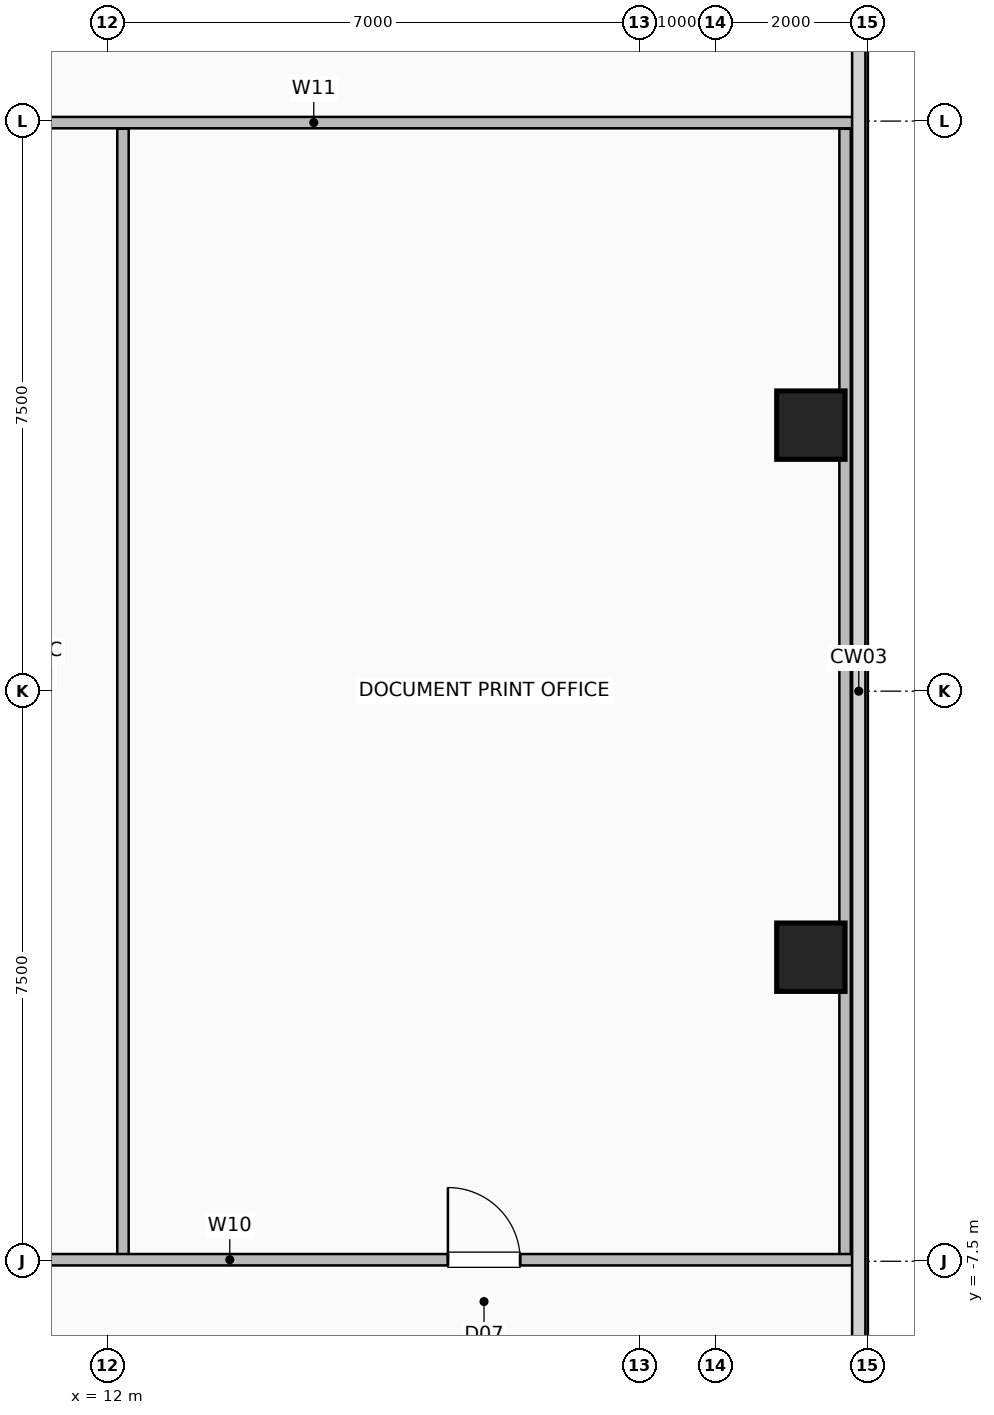
"""IFC4 building model, lengths in metres.
Left out: names, types, materials, properties, quantities, classifications, styles, units other than length and angle.
Written with IfcOpenShell. Run it as: python <this file> out.ifc"""

import sys

from ifc_helpers import new_model, si_unit, direction, frame, frame_2d, origin, origin_2d, place, context, subcontext, project, spatial, rectangle, hollow_rectangle, extrude, element, fill, save


model = new_model("IFC4")
c1 = context("Model", 3, precision=1e-05, world=origin(), true_north=direction((0.0, 1.0)))
c2 = subcontext(c1, "Body", "Model", "MODEL_VIEW")
j1 = project(units=[si_unit("LENGTHUNIT", "METRE"), si_unit("PLANEANGLEUNIT", "RADIAN")], contexts=[c1])
p1 = place(None, origin())
s1 = spatial("IfcSite", under=j1, at=p1, CompositionType="ELEMENT")
p2 = place(p1, origin())
s2 = spatial("IfcBuilding", under=s1, at=p2, CompositionType="ELEMENT")
p3 = place(p2, frame((0.0, 0.0, 101.2)))
s3 = spatial("IfcBuildingStorey", under=s2, at=p3, CompositionType="ELEMENT", Elevation=101.2)
for number, where, z_axis, x_axis in (
    (1, (21.25, -3.5, 0.0), (0.0, 0.0, 1.0), (1.0, 0.0, 0.0)),
    (2, (21.25, 3.5, 0.0), (0.0, 0.0, 1.0), (1.0, 0.0, 0.0)),
):
    element("IfcColumn", number, at=place(p3, frame(where, z_axis=z_axis, x_axis=x_axis)), inside=s3, PredefinedType="COLUMN", context=c2, shape_type="SweptSolid", body=[
        extrude(hollow_rectangle(XDim=0.9, YDim=0.9, WallThickness=0.045, at=origin_2d()), origin(), (0.0, 0.0, 1.0), 3.6),
    ])
for number, where, z_axis, x_axis in (
    (3, (12.2, -7.48, 0.0), (0.0, 0.0, 1.0), (0.0, 1.0, 0.0)),
    (4, (21.7, -7.48, 0.0), (0.0, 0.0, 1.0), (0.0, 1.0, 0.0)),
):
    element("IfcWall", number, at=place(p3, frame(where, z_axis=z_axis, x_axis=x_axis)), inside=s3, PredefinedType="PARTITIONING", context=c2, shape_type="SweptSolid", body=[
        extrude(rectangle(XDim=14.88, YDim=0.15, at=frame_2d((7.44, 0.0))), origin(), (0.0, 0.0, 1.0), 3.36),
    ])
p4 = place(p3, frame((8.28, -7.48, 0.0), z_axis=(0.0, 0.0, 1.0), x_axis=(1.0, 0.0, 0.0)))
e5 = element("IfcWall", 5, at=p4, inside=s3, PredefinedType="PARTITIONING", context=c2, shape_type="SweptSolid", body=[
    extrude(rectangle(XDim=13.54, YDim=0.15, at=frame_2d((6.77, 0.0))), origin(), (0.0, 0.0, 1.0), 3.36),
])
p5 = place(p4, frame((1.505, 0.0, 0.0)))
e6 = element("IfcOpeningElement", 6, at=p5, cuts=e5, PredefinedType="OPENING", context=c2, shape_type="SweptSolid", body=[
    extrude(rectangle(XDim=0.95, YDim=2.06, at=frame_2d((0.475, 1.03))), frame((0.0, 0.085, 0.0), z_axis=(0.0, -1.0, 0.0), x_axis=(1.0, 0.0, 0.0)), (0.0, 0.0, 1.0), 0.17),
])
p6 = place(p4, frame((8.195, 0.0, 0.0)))
e7 = element("IfcOpeningElement", 7, at=p6, cuts=e5, PredefinedType="OPENING", context=c2, shape_type="SweptSolid", body=[
    extrude(rectangle(XDim=0.95, YDim=2.06, at=frame_2d((0.475, 1.03))), frame((0.0, 0.085, 0.0), z_axis=(0.0, -1.0, 0.0), x_axis=(1.0, 0.0, 0.0)), (0.0, 0.0, 1.0), 0.17),
])
p7 = place(p3, frame((7.6, 7.48, 0.0), z_axis=(0.0, 0.0, 1.0), x_axis=(1.0, 0.0, 0.0)))
e8 = element("IfcWall", 8, at=p7, inside=s3, PredefinedType="PARTITIONING", context=c2, shape_type="SweptSolid", body=[
    extrude(rectangle(XDim=14.22, YDim=0.15, at=frame_2d((7.11, 0.0))), origin(), (0.0, 0.0, 1.0), 3.36),
])
p8 = place(p6, origin())
e9 = element("IfcDoor", 9, at=p8, inside=s3, OperationType="SINGLE_SWING_LEFT", PredefinedType="DOOR", context=c2, shape_type="SweptSolid", body=[
    extrude(rectangle(XDim=0.95, YDim=2.06, at=frame_2d((0.475, 1.03))), frame((0.0, 0.025, 0.0), z_axis=(0.0, -1.0, 0.0), x_axis=(1.0, 0.0, 0.0)), (0.0, 0.0, 1.0), 0.05),
])
fill(e7, e9)
save(model, sys.argv[1])
